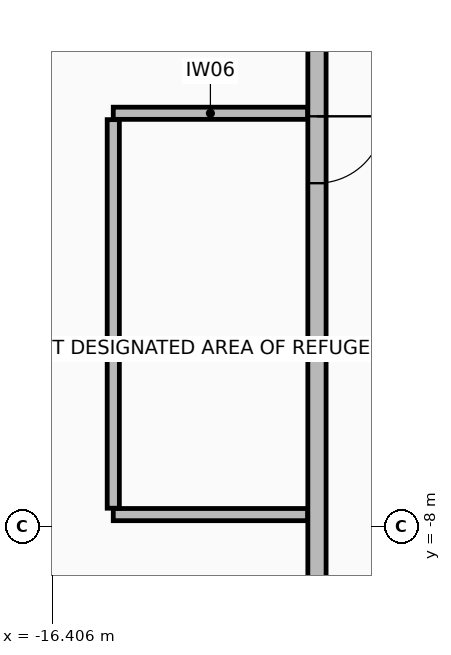
"""IFC4 building model, lengths in metres.
Left out: names, types, materials, properties, quantities, classifications, styles, units other than length and angle.
Written with IfcOpenShell. Run it as: python <this file> out.ifc"""

import sys

from ifc_helpers import new_model, si_unit, direction, frame, frame_2d, origin, place, context, subcontext, project, spatial, rectangle, extrude, element, fill, save


model = new_model("IFC4")
c1 = context("Model", 3, precision=1e-05, world=origin(), true_north=direction((0.0, 1.0)))
c2 = subcontext(c1, "Body", "Model", "MODEL_VIEW")
j1 = project(units=[si_unit("LENGTHUNIT", "METRE"), si_unit("PLANEANGLEUNIT", "RADIAN")], contexts=[c1])
p1 = place(None, origin())
s1 = spatial("IfcSite", under=j1, at=p1, CompositionType="ELEMENT")
p2 = place(p1, origin())
s2 = spatial("IfcBuilding", under=s1, at=p2, CompositionType="ELEMENT")
p3 = place(p2, frame((0.0, 0.0, 165.15)))
s3 = spatial("IfcBuildingStorey", under=s2, at=p3, CompositionType="ELEMENT", Elevation=165.15)
p4 = place(p3, frame((-12.05, 10.75, 0.0), z_axis=(0.0, 0.0, 1.0), x_axis=(0.0, -1.0, 0.0)))
e1 = element("IfcWall", 1, at=p4, inside=s3, PredefinedType="STANDARD", context=c2, shape_type="SweptSolid", body=[
    extrude(rectangle(XDim=21.5, YDim=0.3, at=frame_2d((10.75, 0.0))), origin(), (0.0, 0.0, 1.0), 4.515),
])
p5 = place(p4, frame((12.0, 0.0, 0.0)))
e2 = element("IfcOpeningElement", 2, at=p5, cuts=e1, PredefinedType="OPENING", context=c2, shape_type="SweptSolid", body=[
    extrude(rectangle(XDim=1.1, YDim=2.15, at=frame_2d((0.55, 1.075))), frame((0.0, 0.16, 0.0), z_axis=(0.0, -1.0, 0.0), x_axis=(1.0, 0.0, 0.0)), (0.0, 0.0, 1.0), 0.32),
])
for number, where, z_axis, x_axis in (
    (3, (-15.4, -1.2, 0.0), (0.0, 0.0, 1.0), (1.0, 0.0, 0.0)),
    (4, (-12.205, -7.8, 0.0), (0.0, 0.0, 1.0), (-1.0, 0.0, 0.0)),
):
    element("IfcWall", number, at=place(p3, frame(where, z_axis=z_axis, x_axis=x_axis)), inside=s3, PredefinedType="PARTITIONING", context=c2, shape_type="SweptSolid", body=[
        extrude(rectangle(XDim=3.195, YDim=0.2, at=frame_2d((1.597, 0.0))), origin(), (0.0, 0.0, 1.0), 4.805),
    ])
p6 = place(p3, frame((-15.4, -7.695, 0.0), z_axis=(0.0, 0.0, 1.0), x_axis=(0.0, 1.0, 0.0)))
e5 = element("IfcWall", 5, at=p6, inside=s3, PredefinedType="PARTITIONING", context=c2, shape_type="SweptSolid", body=[
    extrude(rectangle(XDim=6.39, YDim=0.2, at=frame_2d((3.195, 0.0))), origin(), (0.0, 0.0, 1.0), 4.615),
])
p7 = place(p5, origin())
e6 = element("IfcDoor", 6, at=p7, inside=s3, OperationType="SINGLE_SWING_LEFT", PredefinedType="DOOR", context=c2, shape_type="SweptSolid", body=[
    extrude(rectangle(XDim=1.1, YDim=2.15, at=frame_2d((0.55, 1.075))), frame((0.0, 0.025, 0.0), z_axis=(0.0, -1.0, 0.0), x_axis=(1.0, 0.0, 0.0)), (0.0, 0.0, 1.0), 0.05),
])
fill(e2, e6)
save(model, sys.argv[1])
